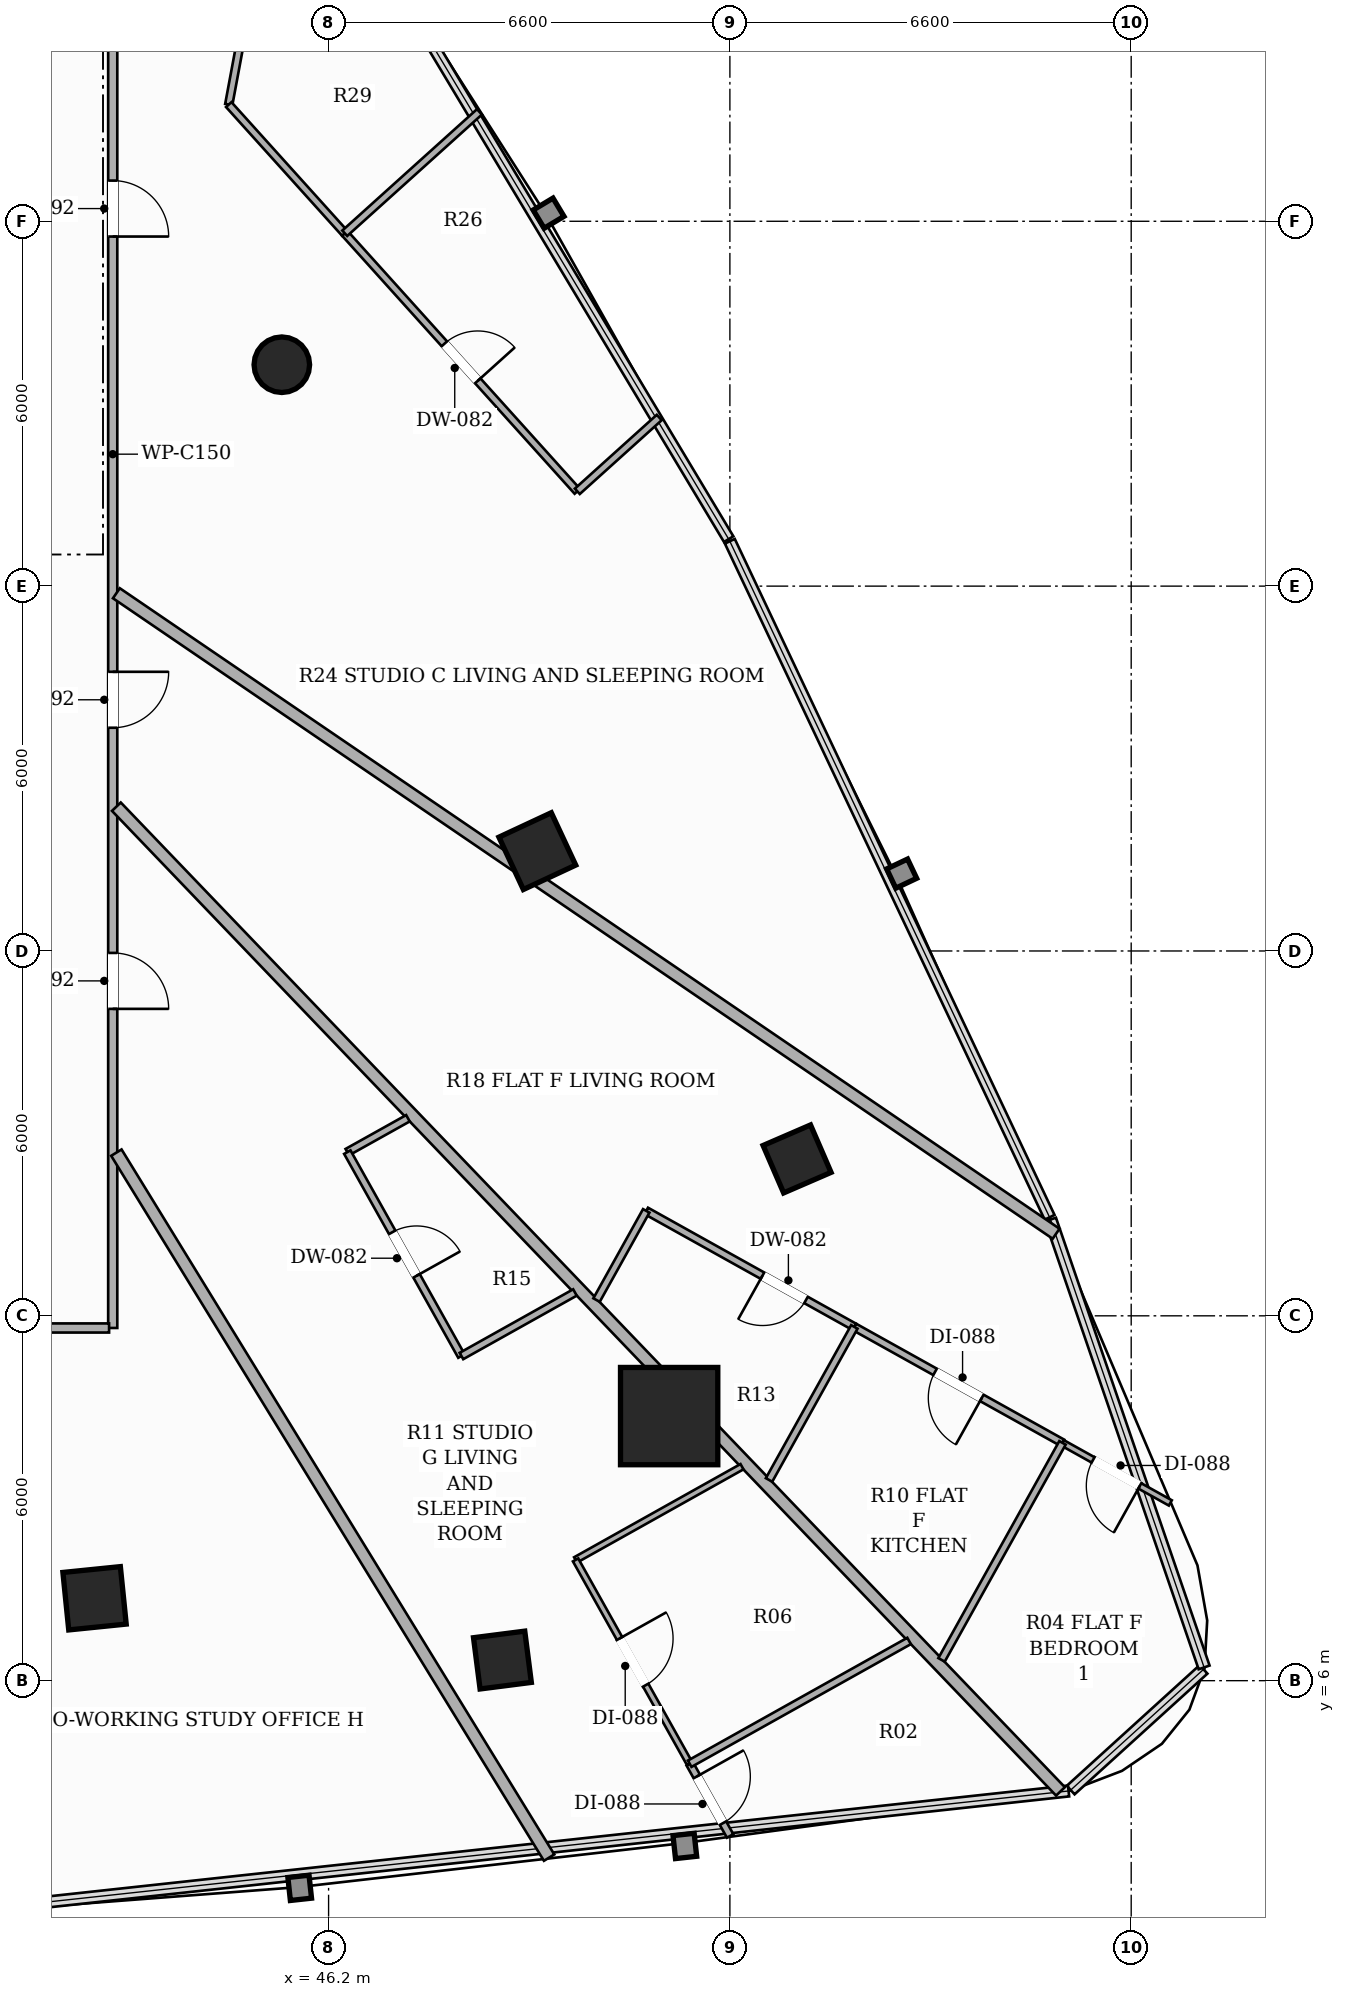
"""IFC4 building model, lengths in metres.
Left out: names, types, materials, properties, quantities, classifications, styles, units other than length and angle.
Written with IfcOpenShell. Run it as: python <this file> out.ifc"""

import sys

from ifc_helpers import new_model, si_unit, direction, frame, frame_2d, origin, origin_2d, place, context, subcontext, project, spatial, rectangle, hollow_rectangle, hollow_circle, extrude, element, fill, save


model = new_model("IFC4")
c1 = context("Model", 3, precision=1e-05, world=origin(), true_north=direction((0.0, 1.0)))
c2 = subcontext(c1, "Body", "Model", "MODEL_VIEW")
j1 = project(units=[si_unit("LENGTHUNIT", "METRE"), si_unit("PLANEANGLEUNIT", "RADIAN")], contexts=[c1])
p1 = place(None, origin())
s1 = spatial("IfcSite", under=j1, at=p1, CompositionType="ELEMENT")
p2 = place(p1, origin())
s2 = spatial("IfcBuilding", under=s1, at=p2, CompositionType="ELEMENT")
p3 = place(p2, frame((0.0, 0.0, 74.15)))
s3 = spatial("IfcBuildingStorey", under=s2, at=p3, CompositionType="ELEMENT", Elevation=74.15)
p4 = place(p3, frame((51.801, 10.351, 0.0), z_axis=(0.0, 0.0, 1.0), x_axis=(1.0, 0.0, 0.0)))
e1 = element("IfcColumn", 1, at=p4, inside=s3, PredefinedType="COLUMN", context=c2, shape_type="SweptSolid", body=[
    extrude(hollow_rectangle(XDim=1.6, YDim=1.6, WallThickness=0.05, at=origin_2d()), origin(), (0.0, 0.0, 1.0), 3.3),
])
for number, where, z_axis, x_axis in (
    (2, (42.351, 7.355, 0.0), (0.0, 0.0, 1.0), (0.995, 0.101, 0.0)),
    (3, (49.633, 19.642, 0.0), (0.0, 0.0, 1.0), (-0.423, 0.906, 0.0)),
):
    element("IfcColumn", number, at=place(p3, frame(where, z_axis=z_axis, x_axis=x_axis)), inside=s3, PredefinedType="COLUMN", context=c2, shape_type="SweptSolid", body=[
        extrude(hollow_rectangle(XDim=0.95, YDim=0.95, WallThickness=0.032, at=origin_2d()), origin(), (0.0, 0.0, 1.0), 3.3),
    ])
p5 = place(p3, frame((45.431, 27.641, 0.0), z_axis=(0.0, 0.0, 1.0), x_axis=(1.0, 0.0, 0.0)))
e4 = element("IfcColumn", 4, at=p5, inside=s3, PredefinedType="COLUMN", context=c2, shape_type="SweptSolid", body=[
    extrude(hollow_circle(Radius=0.457, WallThickness=0.025, at=origin_2d()), origin(), (0.0, 0.0, 1.0), 3.3),
])
for number, where, z_axis, x_axis in (
    (5, (49.059, 6.339, 0.0), (0.0, 0.0, 1.0), (0.992, 0.127, 0.0)),
    (6, (53.905, 14.58, 0.0), (0.0, 0.0, 1.0), (-0.397, 0.918, 0.0)),
):
    element("IfcColumn", number, at=place(p3, frame(where, z_axis=z_axis, x_axis=x_axis)), inside=s3, PredefinedType="COLUMN", context=c2, shape_type="SweptSolid", body=[
        extrude(hollow_rectangle(XDim=0.85, YDim=0.85, WallThickness=0.028, at=origin_2d()), origin(), (0.0, 0.0, 1.0), 3.3),
    ])
p6 = place(p3, frame((42.65, 36.84, 0.0), z_axis=(0.0, 0.0, 1.0), x_axis=(0.0, -1.0, 0.0)))
e7 = element("IfcWall", 7, at=p6, inside=s3, PredefinedType="PARTITIONING", context=c2, shape_type="SweptSolid", body=[
    extrude(rectangle(XDim=25.04, YDim=0.15, at=frame_2d((12.52, 0.0))), origin(), (0.0, 0.0, 1.0), 2.413),
])
p7 = place(p6, frame((6.171, 0.0, 0.0)))
e8 = element("IfcOpeningElement", 8, at=p7, cuts=e7, PredefinedType="OPENING", context=c2, shape_type="SweptSolid", body=[
    extrude(rectangle(XDim=0.92, YDim=2.15, at=frame_2d((0.46, 1.075))), frame((0.0, 0.085, 0.0), z_axis=(0.0, -1.0, 0.0), x_axis=(1.0, 0.0, 0.0)), (0.0, 0.0, 1.0), 0.17),
])
p8 = place(p6, frame((14.249, 0.0, 0.0)))
e9 = element("IfcOpeningElement", 9, at=p8, cuts=e7, PredefinedType="OPENING", context=c2, shape_type="SweptSolid", body=[
    extrude(rectangle(XDim=0.92, YDim=2.15, at=frame_2d((0.46, 1.075))), frame((0.0, 0.085, 0.0), z_axis=(0.0, -1.0, 0.0), x_axis=(1.0, 0.0, 0.0)), (0.0, 0.0, 1.0), 0.17),
])
p9 = place(p6, frame((18.872, 0.0, 0.0)))
e10 = element("IfcOpeningElement", 10, at=p9, cuts=e7, PredefinedType="OPENING", context=c2, shape_type="SweptSolid", body=[
    extrude(rectangle(XDim=0.92, YDim=2.15, at=frame_2d((0.46, 1.075))), frame((0.0, 0.085, 0.0), z_axis=(0.0, -1.0, 0.0), x_axis=(1.0, 0.0, 0.0)), (0.0, 0.0, 1.0), 0.17),
])
p10 = place(p3, frame((42.59, 11.8, 0.0), z_axis=(0.0, 0.0, 1.0), x_axis=(-1.0, 0.0, 0.0)))
e11 = element("IfcWall", 11, at=p10, inside=s3, PredefinedType="PARTITIONING", context=c2, shape_type="SweptSolid", body=[
    extrude(rectangle(XDim=19.24, YDim=0.15, at=frame_2d((9.62, 0.0))), origin(), (0.0, 0.0, 1.0), 2.669),
])
p11 = place(p10, frame((9.24, 0.0, 0.0)))
e12 = element("IfcOpeningElement", 12, at=p11, cuts=e11, PredefinedType="OPENING", context=c2, shape_type="SweptSolid", body=[
    extrude(rectangle(XDim=0.88, YDim=2.1, at=frame_2d((0.44, 1.05))), frame((0.0, 0.085, 0.0), z_axis=(0.0, -1.0, 0.0), x_axis=(1.0, 0.0, 0.0)), (0.0, 0.0, 1.0), 0.17),
])
p12 = place(p10, frame((2.174, 0.0, 0.0)))
e13 = element("IfcOpeningElement", 13, at=p12, cuts=e11, PredefinedType="OPENING", context=c2, shape_type="SweptSolid", body=[
    extrude(rectangle(XDim=0.88, YDim=2.1, at=frame_2d((0.44, 1.05))), frame((0.0, 0.085, 0.0), z_axis=(0.0, -1.0, 0.0), x_axis=(1.0, 0.0, 0.0)), (0.0, 0.0, 1.0), 0.17),
])
p13 = place(p3, frame((58.165, 13.35, 0.0), z_axis=(0.0, 0.0, 1.0), x_axis=(-0.826341659386, 0.563169123766, 0.0)))
e14 = element("IfcWall", 14, at=p13, inside=s3, PredefinedType="PARTITIONING", context=c2, shape_type="SweptSolid", body=[
    extrude(rectangle(XDim=18.703, YDim=0.2, at=frame_2d((9.352, 0.0))), origin(), (0.0, 0.0, 1.0), 2.413),
])
p14 = place(p3, frame((58.237, 4.179, 0.0), z_axis=(0.0, 0.0, 1.0), x_axis=(-0.69208567792, 0.721815360337, 0.0)))
e15 = element("IfcWall", 15, at=p14, inside=s3, PredefinedType="PARTITIONING", context=c2, shape_type="SweptSolid", body=[
    extrude(rectangle(XDim=22.435, YDim=0.2, at=frame_2d((11.218, 0.0))), origin(), (0.0, 0.0, 1.0), 2.413),
])
p15 = place(p3, frame((49.827, 3.09, 0.0), z_axis=(0.0, 0.0, 1.0), x_axis=(-0.523146880199, 0.852242536921, 0.0)))
e16 = element("IfcWall", 16, at=p15, inside=s3, PredefinedType="PARTITIONING", context=c2, shape_type="SweptSolid", body=[
    extrude(rectangle(XDim=13.604, YDim=0.2, at=frame_2d((6.802, 0.0))), origin(), (0.0, 0.0, 1.0), 2.413),
])
p16 = place(p3, frame((46.466, 29.803, 0.0), z_axis=(0.0, 0.0, 1.0), x_axis=(0.669491047861, -0.742820124144, 0.0)))
e17 = element("IfcWall", 17, at=p16, inside=s3, PredefinedType="PARTITIONING", context=c2, shape_type="SweptSolid", body=[
    extrude(rectangle(XDim=5.713, YDim=0.12, at=frame_2d((2.856, 0.0))), origin(), (0.0, 0.0, 1.0), 3.06),
])
p17 = place(p16, frame((2.447, 0.0, 0.0)))
e18 = element("IfcOpeningElement", 18, at=p17, cuts=e17, PredefinedType="OPENING", context=c2, shape_type="SweptSolid", body=[
    extrude(rectangle(XDim=0.82, YDim=2.1, at=frame_2d((0.41, 1.05))), frame((0.0, 0.07, 0.0), z_axis=(0.0, -1.0, 0.0), x_axis=(1.0, 0.0, 0.0)), (0.0, 0.0, 1.0), 0.14),
])
p18 = place(p3, frame((50.291, 25.559, 0.0), z_axis=(0.0, 0.0, 1.0), x_axis=(0.742845405041, 0.669462996894, 0.0)))
e19 = element("IfcWall", 19, at=p18, inside=s3, PredefinedType="PARTITIONING", context=c2, shape_type="SweptSolid", body=[
    extrude(rectangle(XDim=1.813, YDim=0.12, at=frame_2d((0.907, 0.0))), origin(), (0.0, 0.0, 1.0), 3.06),
])
p19 = place(p3, frame((45.45, 36.703, 0.0), z_axis=(0.0, 0.0, 1.0), x_axis=(-0.183267636936, -0.9830630566, 0.0)))
e20 = element("IfcWall", 20, at=p19, inside=s3, PredefinedType="PARTITIONING", context=c2, shape_type="SweptSolid", body=[
    extrude(rectangle(XDim=4.866, YDim=0.12, at=frame_2d((2.433, 0.0))), origin(), (0.0, 0.0, 1.0), 3.06),
])
p20 = place(p19, frame((1.993, 0.0, 0.0)))
e21 = element("IfcOpeningElement", 21, at=p20, cuts=e20, PredefinedType="OPENING", context=c2, shape_type="SweptSolid", body=[
    extrude(rectangle(XDim=0.88, YDim=2.1, at=frame_2d((0.44, 1.05))), frame((0.0, 0.07, 0.0), z_axis=(0.0, -1.0, 0.0), x_axis=(1.0, 0.0, 0.0)), (0.0, 0.0, 1.0), 0.14),
])
p21 = place(p3, frame((44.558, 31.919, 0.0), z_axis=(0.0, 0.0, 1.0), x_axis=(0.669660366513, -0.742667485165, 0.0)))
e22 = element("IfcWall", 22, at=p21, inside=s3, PredefinedType="PARTITIONING", context=c2, shape_type="SweptSolid", body=[
    extrude(rectangle(XDim=2.849, YDim=0.12, at=frame_2d((1.425, 0.0))), origin(), (0.0, 0.0, 1.0), 3.06),
])
p22 = place(p3, frame((46.466, 29.803, 0.0), z_axis=(0.0, 0.0, 1.0), x_axis=(0.742837964983, 0.669471252392, 0.0)))
e23 = element("IfcWall", 23, at=p22, inside=s3, PredefinedType="PARTITIONING", context=c2, shape_type="SweptSolid", body=[
    extrude(rectangle(XDim=2.982, YDim=0.12, at=frame_2d((1.491, 0.0))), origin(), (0.0, 0.0, 1.0), 3.06),
])
p23 = place(p3, frame((54.847, 11.818, 0.0), z_axis=(0.0, 0.0, 1.0), x_axis=(-0.87346578699, 0.486885529624, 0.0)))
e24 = element("IfcWall", 24, at=p23, inside=s3, PredefinedType="PARTITIONING", context=c2, shape_type="SweptSolid", body=[
    extrude(rectangle(XDim=3.919, YDim=0.12, at=frame_2d((1.959, 0.0))), origin(), (0.0, 0.0, 1.0), 2.413),
])
p24 = place(p23, frame((0.91, 0.0, 0.0)))
e25 = element("IfcOpeningElement", 25, at=p24, cuts=e24, PredefinedType="OPENING", context=c2, shape_type="SweptSolid", body=[
    extrude(rectangle(XDim=0.82, YDim=2.1, at=frame_2d((0.41, 1.05))), frame((0.0, 0.07, 0.0), z_axis=(0.0, -1.0, 0.0), x_axis=(1.0, 0.0, 0.0)), (0.0, 0.0, 1.0), 0.14),
])
p25 = place(p3, frame((51.424, 13.726, 0.0), z_axis=(0.0, 0.0, 1.0), x_axis=(-0.486605473044, -0.873621836726, 0.0)))
e26 = element("IfcWall", 26, at=p25, inside=s3, PredefinedType="PARTITIONING", context=c2, shape_type="SweptSolid", body=[
    extrude(rectangle(XDim=1.679, YDim=0.12, at=frame_2d((0.84, 0.0))), origin(), (0.0, 0.0, 1.0), 2.413),
])
p26 = place(p3, frame((58.27, 9.911, 0.0), z_axis=(0.0, 0.0, 1.0), x_axis=(-0.873560029318, 0.486716421727, 0.0)))
e27 = element("IfcWall", 27, at=p26, inside=s3, PredefinedType="PARTITIONING", context=c2, shape_type="SweptSolid", body=[
    extrude(rectangle(XDim=3.918, YDim=0.12, at=frame_2d((1.959, 0.0))), origin(), (0.0, 0.0, 1.0), 2.619),
])
p27 = place(p26, frame((1.519, 0.0, 0.0)))
e28 = element("IfcOpeningElement", 28, at=p27, cuts=e27, PredefinedType="OPENING", context=c2, shape_type="SweptSolid", body=[
    extrude(rectangle(XDim=0.88, YDim=2.1, at=frame_2d((0.44, 1.05))), frame((0.0, 0.07, 0.0), z_axis=(0.0, -1.0, 0.0), x_axis=(1.0, 0.0, 0.0)), (0.0, 0.0, 1.0), 0.14),
])
p28 = place(p3, frame((60.044, 8.923, 0.0), z_axis=(0.0, 0.0, 1.0), x_axis=(-0.873680423781, 0.486500274514, 0.0)))
e29 = element("IfcWall", 29, at=p28, inside=s3, PredefinedType="PARTITIONING", context=c2, shape_type="SweptSolid", body=[
    extrude(rectangle(XDim=2.031, YDim=0.1, at=frame_2d((1.015, 0.0))), origin(), (0.0, 0.0, 1.0), 3.06),
])
p29 = place(p28, frame((0.575, 0.0, 0.0)))
e30 = element("IfcOpeningElement", 30, at=p29, cuts=e29, PredefinedType="OPENING", context=c2, shape_type="SweptSolid", body=[
    extrude(rectangle(XDim=0.88, YDim=2.1, at=frame_2d((0.44, 1.05))), frame((0.0, 0.06, 0.0), z_axis=(0.0, -1.0, 0.0), x_axis=(1.0, 0.0, 0.0)), (0.0, 0.0, 1.0), 0.12),
])
p30 = place(p3, frame((54.847, 11.818, 0.0), z_axis=(0.0, 0.0, 1.0), x_axis=(-0.486822226103, -0.873501070504, 0.0)))
e31 = element("IfcWall", 31, at=p30, inside=s3, PredefinedType="PARTITIONING", context=c2, shape_type="SweptSolid", body=[
    extrude(rectangle(XDim=2.882, YDim=0.12, at=frame_2d((1.441, 0.0))), origin(), (0.0, 0.0, 1.0), 3.06),
])
p31 = place(p3, frame((58.27, 9.911, 0.0), z_axis=(0.0, 0.0, 1.0), x_axis=(-0.486824622959, -0.873499734677, 0.0)))
e32 = element("IfcWall", 32, at=p31, inside=s3, PredefinedType="PARTITIONING", context=c2, shape_type="SweptSolid", body=[
    extrude(rectangle(XDim=4.086, YDim=0.12, at=frame_2d((2.043, 0.0))), origin(), (0.0, 0.0, 1.0), 3.06),
])
p32 = place(p3, frame((47.505, 15.249, 0.0), z_axis=(0.0, 0.0, 1.0), x_axis=(-0.872914025969, -0.487874064967, 0.0)))
e33 = element("IfcWall", 33, at=p32, inside=s3, PredefinedType="PARTITIONING", context=c2, shape_type="SweptSolid", body=[
    extrude(rectangle(XDim=1.142, YDim=0.12, at=frame_2d((0.571, 0.0))), origin(), (0.0, 0.0, 1.0), 3.06),
])
p33 = place(p3, frame((46.508, 14.692, 0.0), z_axis=(0.0, 0.0, 1.0), x_axis=(0.488483407483, -0.872573183529, 0.0)))
e34 = element("IfcWall", 34, at=p33, inside=s3, PredefinedType="PARTITIONING", context=c2, shape_type="SweptSolid", body=[
    extrude(rectangle(XDim=3.843, YDim=0.12, at=frame_2d((1.921, 0.0))), origin(), (0.0, 0.0, 1.0), 3.06),
])
p34 = place(p33, frame((1.511, 0.0, 0.0)))
e35 = element("IfcOpeningElement", 35, at=p34, cuts=e34, PredefinedType="OPENING", context=c2, shape_type="SweptSolid", body=[
    extrude(rectangle(XDim=0.82, YDim=2.1, at=frame_2d((0.41, 1.05))), frame((0.0, 0.07, 0.0), z_axis=(0.0, -1.0, 0.0), x_axis=(1.0, 0.0, 0.0)), (0.0, 0.0, 1.0), 0.14),
])
p35 = place(p3, frame((48.385, 11.339, 0.0), z_axis=(0.0, 0.0, 1.0), x_axis=(0.872618854318, 0.488401817246, 0.0)))
e36 = element("IfcWall", 36, at=p35, inside=s3, PredefinedType="PARTITIONING", context=c2, shape_type="SweptSolid", body=[
    extrude(rectangle(XDim=2.139, YDim=0.12, at=frame_2d((1.07, 0.0))), origin(), (0.0, 0.0, 1.0), 2.413),
])
p36 = place(p3, frame((52.139, 4.634, 0.0), z_axis=(0.0, 0.0, 1.0), x_axis=(0.488778203453, -0.872408085605, 0.0)))
e37 = element("IfcWall", 37, at=p36, inside=s3, PredefinedType="PARTITIONING", context=c2, shape_type="SweptSolid", body=[
    extrude(rectangle(XDim=1.361, YDim=0.12, at=frame_2d((0.68, 0.0))), origin(), (0.0, 0.0, 1.0), 2.619),
])
p37 = place(p36, frame((0.24, 0.0, 0.0)))
e38 = element("IfcOpeningElement", 38, at=p37, cuts=e37, PredefinedType="OPENING", context=c2, shape_type="SweptSolid", body=[
    extrude(rectangle(XDim=0.88, YDim=2.1, at=frame_2d((0.44, 1.05))), frame((0.0, 0.07, 0.0), z_axis=(0.0, -1.0, 0.0), x_axis=(1.0, 0.0, 0.0)), (0.0, 0.0, 1.0), 0.14),
])
p38 = place(p3, frame((52.999, 9.519, 0.0), z_axis=(0.0, 0.0, 1.0), x_axis=(-0.87247814598, -0.488653133406, 0.0)))
e39 = element("IfcWall", 39, at=p38, inside=s3, PredefinedType="PARTITIONING", context=c2, shape_type="SweptSolid", body=[
    extrude(rectangle(XDim=3.137, YDim=0.1, at=frame_2d((1.569, 0.0))), origin(), (0.0, 0.0, 1.0), 2.413),
])
p39 = place(p3, frame((50.262, 7.986, 0.0), z_axis=(0.0, 0.0, 1.0), x_axis=(0.488564666262, -0.872527688317, 0.0)))
e40 = element("IfcWall", 40, at=p39, inside=s3, PredefinedType="PARTITIONING", context=c2, shape_type="SweptSolid", body=[
    extrude(rectangle(XDim=3.842, YDim=0.1, at=frame_2d((1.921, 0.0))), origin(), (0.0, 0.0, 1.0), 2.413),
])
p40 = place(p39, frame((1.481, 0.0, 0.0)))
e41 = element("IfcOpeningElement", 41, at=p40, cuts=e40, PredefinedType="OPENING", context=c2, shape_type="SweptSolid", body=[
    extrude(rectangle(XDim=0.88, YDim=2.1, at=frame_2d((0.44, 1.05))), frame((0.0, 0.06, 0.0), z_axis=(0.0, -1.0, 0.0), x_axis=(1.0, 0.0, 0.0)), (0.0, 0.0, 1.0), 0.12),
])
p41 = place(p3, frame((52.139, 4.634, 0.0), z_axis=(0.0, 0.0, 1.0), x_axis=(0.87266304729, 0.488322850064, 0.0)))
e42 = element("IfcWall", 42, at=p41, inside=s3, PredefinedType="PARTITIONING", context=c2, shape_type="SweptSolid", body=[
    extrude(rectangle(XDim=4.135, YDim=0.12, at=frame_2d((2.067, 0.0))), origin(), (0.0, 0.0, 1.0), 2.619),
])
p42 = place(p7, origin())
e43 = element("IfcDoor", 43, at=p42, inside=s3, OperationType="SINGLE_SWING_RIGHT", PredefinedType="DOOR", context=c2, shape_type="SweptSolid", body=[
    extrude(rectangle(XDim=0.92, YDim=2.15, at=frame_2d((0.46, 1.075))), frame((0.0, 0.025, 0.0), z_axis=(0.0, -1.0, 0.0), x_axis=(1.0, 0.0, 0.0)), (0.0, 0.0, 1.0), 0.05),
])
fill(e8, e43)
p43 = place(p17, origin())
e44 = element("IfcDoor", 44, at=p43, inside=s3, OperationType="SINGLE_SWING_RIGHT", PredefinedType="DOOR", context=c2, shape_type="SweptSolid", body=[
    extrude(rectangle(XDim=0.82, YDim=2.1, at=frame_2d((0.41, 1.05))), frame((0.0, 0.025, 0.0), z_axis=(0.0, -1.0, 0.0), x_axis=(1.0, 0.0, 0.0)), (0.0, 0.0, 1.0), 0.05),
])
fill(e18, e44)
p44 = place(p8, origin())
e45 = element("IfcDoor", 45, at=p44, inside=s3, OperationType="SINGLE_SWING_LEFT", PredefinedType="DOOR", context=c2, shape_type="SweptSolid", body=[
    extrude(rectangle(XDim=0.92, YDim=2.15, at=frame_2d((0.46, 1.075))), frame((0.0, 0.025, 0.0), z_axis=(0.0, -1.0, 0.0), x_axis=(1.0, 0.0, 0.0)), (0.0, 0.0, 1.0), 0.05),
])
fill(e9, e45)
p45 = place(p24, origin())
e46 = element("IfcDoor", 46, at=p45, inside=s3, OperationType="SINGLE_SWING_RIGHT", PredefinedType="DOOR", context=c2, shape_type="SweptSolid", body=[
    extrude(rectangle(XDim=0.82, YDim=2.1, at=frame_2d((0.41, 1.05))), frame((0.0, 0.025, 0.0), z_axis=(0.0, -1.0, 0.0), x_axis=(1.0, 0.0, 0.0)), (0.0, 0.0, 1.0), 0.05),
])
fill(e25, e46)
p46 = place(p27, origin())
e47 = element("IfcDoor", 47, at=p46, inside=s3, OperationType="SINGLE_SWING_LEFT", PredefinedType="DOOR", context=c2, shape_type="SweptSolid", body=[
    extrude(rectangle(XDim=0.88, YDim=2.1, at=frame_2d((0.44, 1.05))), frame((0.0, 0.025, 0.0), z_axis=(0.0, -1.0, 0.0), x_axis=(1.0, 0.0, 0.0)), (0.0, 0.0, 1.0), 0.05),
])
fill(e28, e47)
p47 = place(p29, origin())
e48 = element("IfcDoor", 48, at=p47, inside=s3, OperationType="SINGLE_SWING_LEFT", PredefinedType="DOOR", context=c2, shape_type="SweptSolid", body=[
    extrude(rectangle(XDim=0.88, YDim=2.1, at=frame_2d((0.44, 1.05))), frame((0.0, 0.025, 0.0), z_axis=(0.0, -1.0, 0.0), x_axis=(1.0, 0.0, 0.0)), (0.0, 0.0, 1.0), 0.05),
])
fill(e30, e48)
p48 = place(p9, origin())
e49 = element("IfcDoor", 49, at=p48, inside=s3, OperationType="SINGLE_SWING_RIGHT", PredefinedType="DOOR", context=c2, shape_type="SweptSolid", body=[
    extrude(rectangle(XDim=0.92, YDim=2.15, at=frame_2d((0.46, 1.075))), frame((0.0, 0.025, 0.0), z_axis=(0.0, -1.0, 0.0), x_axis=(1.0, 0.0, 0.0)), (0.0, 0.0, 1.0), 0.05),
])
fill(e10, e49)
p49 = place(p34, origin())
e50 = element("IfcDoor", 50, at=p49, inside=s3, OperationType="SINGLE_SWING_RIGHT", PredefinedType="DOOR", context=c2, shape_type="SweptSolid", body=[
    extrude(rectangle(XDim=0.82, YDim=2.1, at=frame_2d((0.41, 1.05))), frame((0.0, 0.025, 0.0), z_axis=(0.0, -1.0, 0.0), x_axis=(1.0, 0.0, 0.0)), (0.0, 0.0, 1.0), 0.05),
])
fill(e35, e50)
p50 = place(p37, origin())
e51 = element("IfcDoor", 51, at=p50, inside=s3, OperationType="SINGLE_SWING_LEFT", PredefinedType="DOOR", context=c2, shape_type="SweptSolid", body=[
    extrude(rectangle(XDim=0.88, YDim=2.1, at=frame_2d((0.44, 1.05))), frame((0.0, 0.025, 0.0), z_axis=(0.0, -1.0, 0.0), x_axis=(1.0, 0.0, 0.0)), (0.0, 0.0, 1.0), 0.05),
])
fill(e38, e51)
p51 = place(p40, origin())
e52 = element("IfcDoor", 52, at=p51, inside=s3, OperationType="SINGLE_SWING_LEFT", PredefinedType="DOOR", context=c2, shape_type="SweptSolid", body=[
    extrude(rectangle(XDim=0.88, YDim=2.1, at=frame_2d((0.44, 1.05))), frame((0.0, 0.025, 0.0), z_axis=(0.0, -1.0, 0.0), x_axis=(1.0, 0.0, 0.0)), (0.0, 0.0, 1.0), 0.05),
])
fill(e41, e52)
save(model, sys.argv[1])
